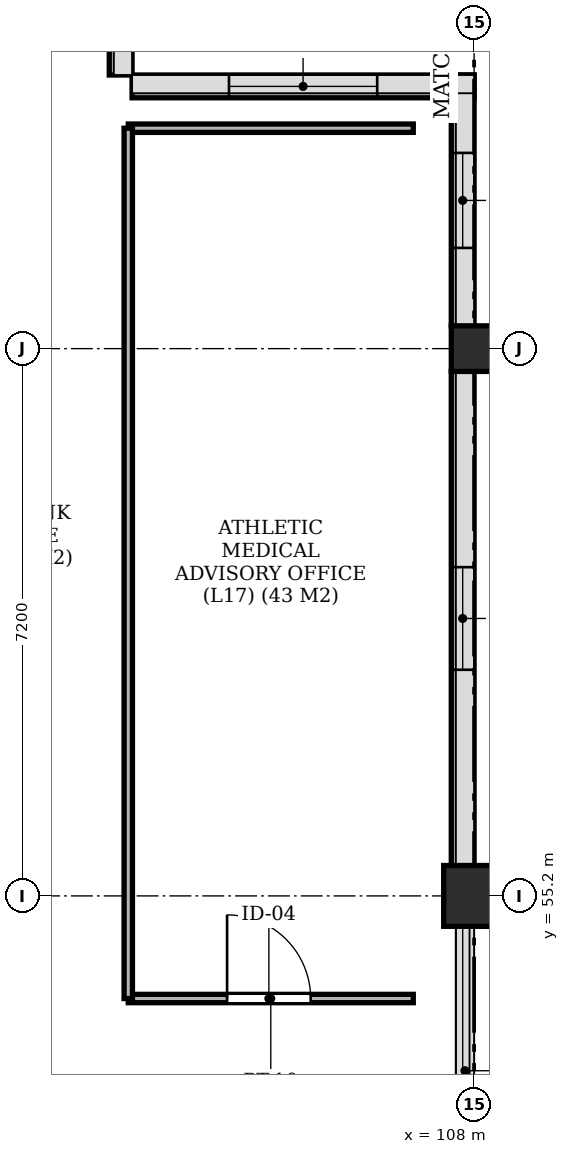
"""IFC4 building model, lengths in metres.
Left out: names, types, materials, properties, quantities, classifications, styles, units other than length and angle.
Written with IfcOpenShell. Run it as: python <this file> out.ifc"""

import sys

from ifc_helpers import new_model, si_unit, direction, frame, frame_2d, origin, origin_2d, place, context, subcontext, project, spatial, rectangle, extrude, element, fill, save


model = new_model("IFC4")
c1 = context("Model", 3, precision=1e-05, world=origin(), true_north=direction((0.0, 1.0)))
c2 = subcontext(c1, "Body", "Model", "MODEL_VIEW")
j1 = project(units=[si_unit("LENGTHUNIT", "METRE"), si_unit("PLANEANGLEUNIT", "RADIAN")], contexts=[c1])
p1 = place(None, origin())
s1 = spatial("IfcSite", under=j1, at=p1, CompositionType="ELEMENT")
p2 = place(p1, origin())
s2 = spatial("IfcBuilding", under=s1, at=p2, CompositionType="ELEMENT")
p3 = place(p2, frame((0.0, 0.0, 66.55)))
s3 = spatial("IfcBuildingStorey", under=s2, at=p3, CompositionType="ELEMENT", Elevation=66.55)
p4 = place(p3, frame((108.0, 55.2, -0.24), z_axis=(0.0, 0.0, 1.0), x_axis=(1.0, 0.0, 0.0)))
e1 = element("IfcColumn", 1, at=p4, inside=s3, PredefinedType="COLUMN", context=c2, shape_type="SweptSolid", body=[
    extrude(rectangle(XDim=0.8, YDim=0.8, at=origin_2d()), origin(), (0.0, 0.0, 1.0), 3.19),
])
p5 = place(p3, frame((108.0, 62.4, -0.24), z_axis=(0.0, 0.0, 1.0), x_axis=(1.0, 0.0, 0.0)))
e2 = element("IfcColumn", 2, at=p5, inside=s3, PredefinedType="COLUMN", context=c2, shape_type="SweptSolid", body=[
    extrude(rectangle(XDim=0.6, YDim=0.6, at=origin_2d()), origin(), (0.0, 0.0, 1.0), 3.19),
])
p6 = place(p3, frame((107.85, 55.6, 0.0), z_axis=(0.0, 0.0, 1.0), x_axis=(0.0, 1.0, 0.0)))
e3 = element("IfcWall", 3, at=p6, inside=s3, PredefinedType="SOLIDWALL", context=c2, shape_type="SweptSolid", body=[
    extrude(rectangle(XDim=6.5, YDim=0.3, at=frame_2d((3.25, 0.0))), origin(), (0.0, 0.0, 1.0), 2.53),
])
p7 = place(p6, frame((2.575, 0.0, 0.62)))
e4 = element("IfcOpeningElement", 4, at=p7, cuts=e3, PredefinedType="OPENING", context=c2, shape_type="SweptSolid", body=[
    extrude(rectangle(XDim=1.35, YDim=1.8, at=frame_2d((0.675, 0.9))), frame((0.0, 0.162, 0.0), z_axis=(0.0, -1.0, 0.0), x_axis=(1.0, 0.0, 0.0)), (0.0, 0.0, 1.0), 0.324),
])
p8 = place(p3, frame((107.85, 62.7, 0.0), z_axis=(0.0, 0.0, 1.0), x_axis=(0.0, 1.0, 0.0)))
e5 = element("IfcWall", 5, at=p8, inside=s3, PredefinedType="SOLIDWALL", context=c2, shape_type="SweptSolid", body=[
    extrude(rectangle(XDim=3.3, YDim=0.3, at=frame_2d((1.65, 0.0))), origin(), (0.0, 0.0, 1.0), 2.53),
])
p9 = place(p8, frame((1.025, 0.0, 0.62)))
e6 = element("IfcOpeningElement", 6, at=p9, cuts=e5, PredefinedType="OPENING", context=c2, shape_type="SweptSolid", body=[
    extrude(rectangle(XDim=1.25, YDim=1.75, at=frame_2d((0.625, 0.875))), frame((0.0, 0.162, 0.0), z_axis=(0.0, -1.0, 0.0), x_axis=(1.0, 0.0, 0.0)), (0.0, 0.0, 1.0), 0.324),
])
p10 = place(p3, frame((108.0, 65.85, 0.0), z_axis=(0.0, 0.0, 1.0), x_axis=(-1.0, 0.0, 0.0)))
e7 = element("IfcWall", 7, at=p10, inside=s3, PredefinedType="SOLIDWALL", context=c2, shape_type="SweptSolid", body=[
    extrude(rectangle(XDim=4.5, YDim=0.3, at=frame_2d((2.25, 0.0))), origin(), (0.0, 0.0, 1.0), 2.53),
])
p11 = place(p10, frame((1.275, 0.0, 0.62)))
e8 = element("IfcOpeningElement", 8, at=p11, cuts=e7, PredefinedType="OPENING", context=c2, shape_type="SweptSolid", body=[
    extrude(rectangle(XDim=1.95, YDim=1.81, at=frame_2d((0.975, 0.905))), frame((0.0, 0.162, 0.0), z_axis=(0.0, -1.0, 0.0), x_axis=(1.0, 0.0, 0.0)), (0.0, 0.0, 1.0), 0.324),
])
p12 = place(p3, frame((103.35, 66.0, 0.0), z_axis=(0.0, 0.0, 1.0), x_axis=(0.0, 1.0, 0.0)))
e9 = element("IfcWall", 9, at=p12, inside=s3, PredefinedType="SOLIDWALL", context=c2, shape_type="SweptSolid", body=[
    extrude(rectangle(XDim=3.6, YDim=0.3, at=frame_2d((1.8, 0.0))), origin(), (0.0, 0.0, 1.0), 2.53),
])
p13 = place(p3, frame((107.88, 39.8, 3.25), z_axis=(0.0, 0.0, 1.0), x_axis=(0.0, 1.0, 0.0)))
e10 = element("IfcWall", 10, at=p13, inside=s3, PredefinedType="PARAPET", context=c2, shape_type="SweptSolid", body=[
    extrude(rectangle(XDim=26.2, YDim=0.24, at=frame_2d((13.1, 0.0))), origin(), (0.0, 0.0, 1.0), 1.25),
])
p14 = place(p3, frame((108.0, 65.88, 3.25), z_axis=(0.0, 0.0, 1.0), x_axis=(-1.0, 0.0, 0.0)))
e11 = element("IfcWall", 11, at=p14, inside=s3, PredefinedType="PARAPET", context=c2, shape_type="SweptSolid", body=[
    extrude(rectangle(XDim=4.5, YDim=0.24, at=frame_2d((2.25, 0.0))), origin(), (0.0, 0.0, 1.0), 1.25),
])
p15 = place(p3, frame((103.38, 66.0, 3.25), z_axis=(0.0, 0.0, 1.0), x_axis=(0.0, 1.0, 0.0)))
e12 = element("IfcWall", 12, at=p15, inside=s3, PredefinedType="PARAPET", context=c2, shape_type="SweptSolid", body=[
    extrude(rectangle(XDim=3.6, YDim=0.24, at=frame_2d((1.8, 0.0))), origin(), (0.0, 0.0, 1.0), 1.25),
])
p16 = place(p3, frame((103.45, 53.85, 0.0), z_axis=(0.0, 0.0, 1.0), x_axis=(1.0, 0.0, 0.0)))
e13 = element("IfcWall", 13, at=p16, inside=s3, PredefinedType="PARTITIONING", context=c2, shape_type="SweptSolid", body=[
    extrude(rectangle(XDim=3.75, YDim=0.11, at=frame_2d((1.875, 0.0))), origin(), (0.0, 0.0, 1.0), 2.53),
])
p17 = place(p16, frame((1.3, 0.0, 0.0)))
e14 = element("IfcOpeningElement", 14, at=p17, cuts=e13, PredefinedType="OPENING", context=c2, shape_type="SweptSolid", body=[
    extrude(rectangle(XDim=1.1, YDim=2.15, at=frame_2d((0.55, 1.075))), frame((0.0, 0.067, 0.0), z_axis=(0.0, -1.0, 0.0), x_axis=(1.0, 0.0, 0.0)), (0.0, 0.0, 1.0), 0.134),
])
p18 = place(p3, frame((103.45, 65.3, 0.0), z_axis=(0.0, 0.0, 1.0), x_axis=(1.0, 0.0, 0.0)))
e15 = element("IfcWall", 15, at=p18, inside=s3, PredefinedType="PARTITIONING", context=c2, shape_type="SweptSolid", body=[
    extrude(rectangle(XDim=3.75, YDim=0.11, at=frame_2d((1.875, 0.0))), origin(), (0.0, 0.0, 1.0), 2.53),
])
p19 = place(p3, frame((103.45, 53.85, 0.0), z_axis=(0.0, 0.0, 1.0), x_axis=(0.0, 1.0, 0.0)))
e16 = element("IfcWall", 16, at=p19, inside=s3, PredefinedType="PARTITIONING", context=c2, shape_type="SweptSolid", body=[
    extrude(rectangle(XDim=11.45, YDim=0.11, at=frame_2d((5.725, 0.0))), origin(), (0.0, 0.0, 1.0), 2.53),
])
p20 = place(p7, origin())
e17 = element("IfcWindow", 17, at=p20, inside=s3, PartitioningType="SINGLE_PANEL", PredefinedType="WINDOW", context=c2, shape_type="SweptSolid", body=[
    extrude(rectangle(XDim=1.35, YDim=1.8, at=frame_2d((0.675, 0.9))), frame((0.0, 0.03, 0.0), z_axis=(0.0, -1.0, 0.0), x_axis=(1.0, 0.0, 0.0)), (0.0, 0.0, 1.0), 0.06),
])
fill(e4, e17)
p21 = place(p9, origin())
e18 = element("IfcWindow", 18, at=p21, inside=s3, PartitioningType="SINGLE_PANEL", PredefinedType="WINDOW", context=c2, shape_type="SweptSolid", body=[
    extrude(rectangle(XDim=1.25, YDim=1.75, at=frame_2d((0.625, 0.875))), frame((0.0, 0.03, 0.0), z_axis=(0.0, -1.0, 0.0), x_axis=(1.0, 0.0, 0.0)), (0.0, 0.0, 1.0), 0.06),
])
fill(e6, e18)
p22 = place(p11, origin())
e19 = element("IfcWindow", 19, at=p22, inside=s3, PartitioningType="SINGLE_PANEL", PredefinedType="WINDOW", context=c2, shape_type="SweptSolid", body=[
    extrude(rectangle(XDim=1.95, YDim=1.81, at=frame_2d((0.975, 0.905))), frame((0.0, 0.03, 0.0), z_axis=(0.0, -1.0, 0.0), x_axis=(1.0, 0.0, 0.0)), (0.0, 0.0, 1.0), 0.06),
])
fill(e8, e19)
p23 = place(p17, origin())
e20 = element("IfcDoor", 20, at=p23, inside=s3, OperationType="SINGLE_SWING_LEFT", PredefinedType="DOOR", context=c2, shape_type="SweptSolid", body=[
    extrude(rectangle(XDim=1.1, YDim=2.15, at=frame_2d((0.55, 1.075))), frame((0.0, 0.025, 0.0), z_axis=(0.0, -1.0, 0.0), x_axis=(1.0, 0.0, 0.0)), (0.0, 0.0, 1.0), 0.05),
])
fill(e14, e20)
save(model, sys.argv[1])
